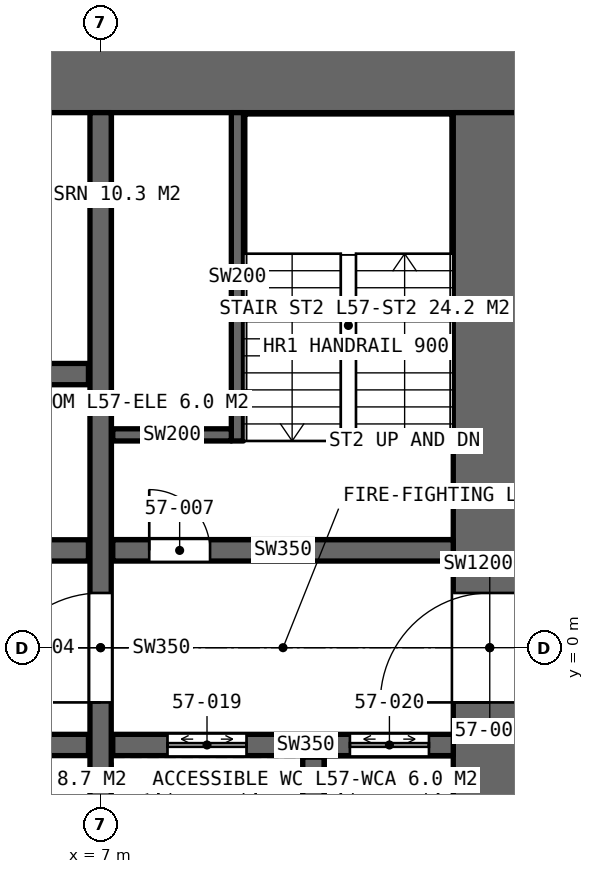
"""IFC4 building model, lengths in metres.
Left out: names, types, materials, properties, quantities, classifications, styles, units other than length and angle.
Written with IfcOpenShell. Run it as: python <this file> out.ifc"""

import sys

from ifc_helpers import new_model, si_unit, direction, frame, frame_2d, origin, place, context, subcontext, project, spatial, rectangle, extrude, element, fill, save


model = new_model("IFC4")
c1 = context("Model", 3, precision=1e-05, world=origin(), true_north=direction((0.0, 1.0)))
c2 = subcontext(c1, "Body", "Model", "MODEL_VIEW")
j1 = project(units=[si_unit("LENGTHUNIT", "METRE"), si_unit("PLANEANGLEUNIT", "RADIAN")], contexts=[c1])
p1 = place(None, origin())
s1 = spatial("IfcSite", under=j1, at=p1, CompositionType="ELEMENT")
p2 = place(p1, origin())
s2 = spatial("IfcBuilding", under=s1, at=p2, CompositionType="ELEMENT")
p3 = place(p2, frame((0.0, 0.0, 257.8)))
s3 = spatial("IfcBuildingStorey", under=s2, at=p3, CompositionType="ELEMENT", Elevation=257.8)
p4 = place(p3, frame((14.0, 9.4, 0.0), z_axis=(0.0, 0.0, 1.0), x_axis=(-1.0, 0.0, 0.0)))
e1 = element("IfcWall", 1, at=p4, inside=s3, PredefinedType="SHEAR", context=c2, shape_type="SweptSolid", body=[
    extrude(rectangle(XDim=28.0, YDim=1.2, at=frame_2d((14.0, 0.0))), origin(), (0.0, 0.0, 1.0), 4.2),
])
p5 = place(p4, frame((24.0, 0.0, 0.0)))
e2 = element("IfcOpeningElement", 2, at=p5, cuts=e1, PredefinedType="OPENING", context=c2, shape_type="SweptSolid", body=[
    extrude(rectangle(XDim=1.0, YDim=2.4, at=frame_2d((0.5, 1.2))), frame((0.0, 0.61, 0.0), z_axis=(0.0, -1.0, 0.0), x_axis=(1.0, 0.0, 0.0)), (0.0, 0.0, 1.0), 1.22),
])
p6 = place(p3, frame((13.4, -8.8, 0.0), z_axis=(0.0, 0.0, 1.0), x_axis=(0.0, 1.0, 0.0)))
e3 = element("IfcWall", 3, at=p6, inside=s3, PredefinedType="SHEAR", context=c2, shape_type="SweptSolid", body=[
    extrude(rectangle(XDim=17.6, YDim=1.2, at=frame_2d((8.8, 0.0))), origin(), (0.0, 0.0, 1.0), 4.2),
])
p7 = place(p6, frame((7.9, 0.0, 0.0)))
e4 = element("IfcOpeningElement", 4, at=p7, cuts=e3, PredefinedType="OPENING", context=c2, shape_type="SweptSolid", body=[
    extrude(rectangle(XDim=1.8, YDim=2.4, at=frame_2d((0.9, 1.2))), frame((0.0, 0.61, 0.0), z_axis=(0.0, -1.0, 0.0), x_axis=(1.0, 0.0, 0.0)), (0.0, 0.0, 1.0), 1.22),
])
p8 = place(p3, frame((7.0, -8.8, 0.0), z_axis=(0.0, 0.0, 1.0), x_axis=(0.0, 1.0, 0.0)))
e5 = element("IfcWall", 5, at=p8, inside=s3, PredefinedType="SHEAR", context=c2, shape_type="SweptSolid", body=[
    extrude(rectangle(XDim=17.6, YDim=0.35, at=frame_2d((8.8, 0.0))), origin(), (0.0, 0.0, 1.0), 4.2),
])
p9 = place(p8, frame((7.9, 0.0, 0.0)))
e6 = element("IfcOpeningElement", 6, at=p9, cuts=e5, PredefinedType="OPENING", context=c2, shape_type="SweptSolid", body=[
    extrude(rectangle(XDim=1.8, YDim=2.4, at=frame_2d((0.9, 1.2))), frame((0.0, 0.185, 0.0), z_axis=(0.0, -1.0, 0.0), x_axis=(1.0, 0.0, 0.0)), (0.0, 0.0, 1.0), 0.37),
])
p10 = place(p3, frame((-6.8, 1.6, 0.0), z_axis=(0.0, 0.0, 1.0), x_axis=(1.0, 0.0, 0.0)))
e7 = element("IfcWall", 7, at=p10, inside=s3, PredefinedType="SHEAR", context=c2, shape_type="SweptSolid", body=[
    extrude(rectangle(XDim=13.6, YDim=0.35, at=frame_2d((6.8, 0.0))), origin(), (0.0, 0.0, 1.0), 4.2),
])
p11 = place(p10, frame((11.9, 0.0, 0.0)))
e8 = element("IfcOpeningElement", 8, at=p11, cuts=e7, PredefinedType="OPENING", context=c2, shape_type="SweptSolid", body=[
    extrude(rectangle(XDim=1.0, YDim=2.4, at=frame_2d((0.5, 1.2))), frame((0.0, 0.185, 0.0), z_axis=(0.0, -1.0, 0.0), x_axis=(1.0, 0.0, 0.0)), (0.0, 0.0, 1.0), 0.37),
])
p12 = place(p10, frame((4.5, 0.0, 0.0)))
e9 = element("IfcOpeningElement", 9, at=p12, cuts=e7, PredefinedType="OPENING", context=c2, shape_type="SweptSolid", body=[
    extrude(rectangle(XDim=1.8, YDim=2.4, at=frame_2d((0.9, 1.2))), frame((0.0, 0.185, 0.0), z_axis=(0.0, -1.0, 0.0), x_axis=(1.0, 0.0, 0.0)), (0.0, 0.0, 1.0), 0.37),
])
p13 = place(p3, frame((-6.8, -1.6, 0.0), z_axis=(0.0, 0.0, 1.0), x_axis=(1.0, 0.0, 0.0)))
e10 = element("IfcWall", 10, at=p13, inside=s3, PredefinedType="SHEAR", context=c2, shape_type="SweptSolid", body=[
    extrude(rectangle(XDim=13.6, YDim=0.35, at=frame_2d((6.8, 0.0))), origin(), (0.0, 0.0, 1.0), 4.2),
])
p14 = place(p13, frame((0.365, 0.0, 0.0)))
e11 = element("IfcOpeningElement", 11, at=p14, cuts=e10, PredefinedType="OPENING", context=c2, shape_type="SweptSolid", body=[
    extrude(rectangle(XDim=1.0, YDim=2.4, at=frame_2d((0.5, 1.2))), frame((0.0, 0.185, 0.0), z_axis=(0.0, -1.0, 0.0), x_axis=(1.0, 0.0, 0.0)), (0.0, 0.0, 1.0), 0.37),
])
p15 = place(p13, frame((3.1, 0.0, 0.0)))
e12 = element("IfcOpeningElement", 12, at=p15, cuts=e10, PredefinedType="OPENING", context=c2, shape_type="SweptSolid", body=[
    extrude(rectangle(XDim=1.0, YDim=2.4, at=frame_2d((0.5, 1.2))), frame((0.0, 0.185, 0.0), z_axis=(0.0, -1.0, 0.0), x_axis=(1.0, 0.0, 0.0)), (0.0, 0.0, 1.0), 0.37),
])
p16 = place(p13, frame((6.7, 0.0, 0.0)))
e13 = element("IfcOpeningElement", 13, at=p16, cuts=e10, PredefinedType="OPENING", context=c2, shape_type="SweptSolid", body=[
    extrude(rectangle(XDim=1.0, YDim=2.4, at=frame_2d((0.5, 1.2))), frame((0.0, 0.185, 0.0), z_axis=(0.0, -1.0, 0.0), x_axis=(1.0, 0.0, 0.0)), (0.0, 0.0, 1.0), 0.37),
])
p17 = place(p13, frame((9.485, 0.0, 0.0)))
e14 = element("IfcOpeningElement", 14, at=p17, cuts=e10, PredefinedType="OPENING", context=c2, shape_type="SweptSolid", body=[
    extrude(rectangle(XDim=0.9, YDim=2.4, at=frame_2d((0.45, 1.2))), frame((0.0, 0.185, 0.0), z_axis=(0.0, -1.0, 0.0), x_axis=(1.0, 0.0, 0.0)), (0.0, 0.0, 1.0), 0.37),
])
p18 = place(p13, frame((11.85, 0.0, 0.0)))
e15 = element("IfcOpeningElement", 15, at=p18, cuts=e10, PredefinedType="OPENING", context=c2, shape_type="SweptSolid", body=[
    extrude(rectangle(XDim=1.1, YDim=2.4, at=frame_2d((0.55, 1.2))), frame((0.0, 0.185, 0.0), z_axis=(0.0, -1.0, 0.0), x_axis=(1.0, 0.0, 0.0)), (0.0, 0.0, 1.0), 0.37),
])
p19 = place(p3, frame((-6.8, 4.5, 0.0), z_axis=(0.0, 0.0, 1.0), x_axis=(1.0, 0.0, 0.0)))
e16 = element("IfcWall", 16, at=p19, inside=s3, PredefinedType="SHEAR", context=c2, shape_type="SweptSolid", body=[
    extrude(rectangle(XDim=13.6, YDim=0.35, at=frame_2d((6.8, 0.0))), origin(), (0.0, 0.0, 1.0), 4.2),
])
p20 = place(p19, frame((0.7, 0.0, 0.0)))
e17 = element("IfcOpeningElement", 17, at=p20, cuts=e16, PredefinedType="OPENING", context=c2, shape_type="SweptSolid", body=[
    extrude(rectangle(XDim=1.1, YDim=2.4, at=frame_2d((0.55, 1.2))), frame((0.0, 0.185, 0.0), z_axis=(0.0, -1.0, 0.0), x_axis=(1.0, 0.0, 0.0)), (0.0, 0.0, 1.0), 0.37),
])
p21 = place(p19, frame((3.5, 0.0, 0.0)))
e18 = element("IfcOpeningElement", 18, at=p21, cuts=e16, PredefinedType="OPENING", context=c2, shape_type="SweptSolid", body=[
    extrude(rectangle(XDim=1.1, YDim=2.4, at=frame_2d((0.55, 1.2))), frame((0.0, 0.185, 0.0), z_axis=(0.0, -1.0, 0.0), x_axis=(1.0, 0.0, 0.0)), (0.0, 0.0, 1.0), 0.37),
])
p22 = place(p19, frame((6.3, 0.0, 0.0)))
e19 = element("IfcOpeningElement", 19, at=p22, cuts=e16, PredefinedType="OPENING", context=c2, shape_type="SweptSolid", body=[
    extrude(rectangle(XDim=1.1, YDim=2.4, at=frame_2d((0.55, 1.2))), frame((0.0, 0.185, 0.0), z_axis=(0.0, -1.0, 0.0), x_axis=(1.0, 0.0, 0.0)), (0.0, 0.0, 1.0), 0.37),
])
p23 = place(p19, frame((9.1, 0.0, 0.0)))
e20 = element("IfcOpeningElement", 20, at=p23, cuts=e16, PredefinedType="OPENING", context=c2, shape_type="SweptSolid", body=[
    extrude(rectangle(XDim=1.1, YDim=2.4, at=frame_2d((0.55, 1.2))), frame((0.0, 0.185, 0.0), z_axis=(0.0, -1.0, 0.0), x_axis=(1.0, 0.0, 0.0)), (0.0, 0.0, 1.0), 0.37),
])
p24 = place(p3, frame((7.2, 1.6, 0.0), z_axis=(0.0, 0.0, 1.0), x_axis=(1.0, 0.0, 0.0)))
e21 = element("IfcWall", 21, at=p24, inside=s3, PredefinedType="SHEAR", context=c2, shape_type="SweptSolid", body=[
    extrude(rectangle(XDim=5.6, YDim=0.35, at=frame_2d((2.8, 0.0))), origin(), (0.0, 0.0, 1.0), 4.2),
])
p25 = place(p24, frame((0.6, 0.0, 0.0)))
e22 = element("IfcOpeningElement", 22, at=p25, cuts=e21, PredefinedType="OPENING", context=c2, shape_type="SweptSolid", body=[
    extrude(rectangle(XDim=1.0, YDim=2.4, at=frame_2d((0.5, 1.2))), frame((0.0, 0.185, 0.0), z_axis=(0.0, -1.0, 0.0), x_axis=(1.0, 0.0, 0.0)), (0.0, 0.0, 1.0), 0.37),
])
p26 = place(p3, frame((7.2, -1.6, 0.0), z_axis=(0.0, 0.0, 1.0), x_axis=(1.0, 0.0, 0.0)))
e23 = element("IfcWall", 23, at=p26, inside=s3, PredefinedType="SHEAR", context=c2, shape_type="SweptSolid", body=[
    extrude(rectangle(XDim=5.6, YDim=0.35, at=frame_2d((2.8, 0.0))), origin(), (0.0, 0.0, 1.0), 4.2),
])
p27 = place(p26, frame((0.9, 0.0, 0.0)))
e24 = element("IfcOpeningElement", 24, at=p27, cuts=e23, PredefinedType="OPENING", context=c2, shape_type="SweptSolid", body=[
    extrude(rectangle(XDim=1.3, YDim=2.4, at=frame_2d((0.65, 1.2))), frame((0.0, 0.185, 0.0), z_axis=(0.0, -1.0, 0.0), x_axis=(1.0, 0.0, 0.0)), (0.0, 0.0, 1.0), 0.37),
])
p28 = place(p26, frame((3.9, 0.0, 0.0)))
e25 = element("IfcOpeningElement", 25, at=p28, cuts=e23, PredefinedType="OPENING", context=c2, shape_type="SweptSolid", body=[
    extrude(rectangle(XDim=1.3, YDim=2.4, at=frame_2d((0.65, 1.2))), frame((0.0, 0.185, 0.0), z_axis=(0.0, -1.0, 0.0), x_axis=(1.0, 0.0, 0.0)), (0.0, 0.0, 1.0), 0.37),
])
p29 = place(p3, frame((10.5, -4.8, 0.0), z_axis=(0.0, 0.0, 1.0), x_axis=(0.0, 1.0, 0.0)))
e26 = element("IfcWall", 26, at=p29, inside=s3, PredefinedType="SHEAR", context=c2, shape_type="SweptSolid", body=[
    extrude(rectangle(XDim=3.0, YDim=0.35, at=frame_2d((1.5, 0.0))), origin(), (0.0, 0.0, 1.0), 4.2),
])
p30 = place(p3, frame((9.25, 3.4, 0.0), z_axis=(0.0, 0.0, 1.0), x_axis=(0.0, 1.0, 0.0)))
e27 = element("IfcWall", 27, at=p30, inside=s3, PredefinedType="SOLIDWALL", context=c2, shape_type="SweptSolid", body=[
    extrude(rectangle(XDim=5.4, YDim=0.2, at=frame_2d((2.7, 0.0))), origin(), (0.0, 0.0, 1.0), 4.2),
])
p31 = place(p3, frame((9.15, 3.5, 0.0), z_axis=(0.0, 0.0, 1.0), x_axis=(-1.0, 0.0, 0.0)))
e28 = element("IfcWall", 28, at=p31, inside=s3, PredefinedType="SOLIDWALL", context=c2, shape_type="SweptSolid", body=[
    extrude(rectangle(XDim=1.95, YDim=0.2, at=frame_2d((0.975, 0.0))), origin(), (0.0, 0.0, 1.0), 4.2),
])
p32 = place(p7, origin())
e29 = element("IfcDoor", 29, at=p32, inside=s3, OperationType="DOUBLE_DOOR_SINGLE_SWING", PredefinedType="DOOR", context=c2, shape_type="SweptSolid", body=[
    extrude(rectangle(XDim=1.8, YDim=2.4, at=frame_2d((0.9, 1.2))), frame((0.0, 0.025, 0.0), z_axis=(0.0, -1.0, 0.0), x_axis=(1.0, 0.0, 0.0)), (0.0, 0.0, 1.0), 0.05),
])
fill(e4, e29)
p33 = place(p9, origin())
e30 = element("IfcDoor", 30, at=p33, inside=s3, OperationType="DOUBLE_DOOR_SINGLE_SWING", PredefinedType="DOOR", context=c2, shape_type="SweptSolid", body=[
    extrude(rectangle(XDim=1.8, YDim=2.4, at=frame_2d((0.9, 1.2))), frame((0.0, 0.025, 0.0), z_axis=(0.0, -1.0, 0.0), x_axis=(1.0, 0.0, 0.0)), (0.0, 0.0, 1.0), 0.05),
])
fill(e6, e30)
p34 = place(p25, origin())
e31 = element("IfcDoor", 31, at=p34, inside=s3, OperationType="SINGLE_SWING_LEFT", PredefinedType="DOOR", context=c2, shape_type="SweptSolid", body=[
    extrude(rectangle(XDim=1.0, YDim=2.4, at=frame_2d((0.5, 1.2))), frame((0.0, 0.025, 0.0), z_axis=(0.0, -1.0, 0.0), x_axis=(1.0, 0.0, 0.0)), (0.0, 0.0, 1.0), 0.05),
])
fill(e22, e31)
p35 = place(p27, origin())
e32 = element("IfcDoor", 32, at=p35, inside=s3, OperationType="DOUBLE_DOOR_SLIDING", PredefinedType="DOOR", context=c2, shape_type="SweptSolid", body=[
    extrude(rectangle(XDim=1.3, YDim=2.4, at=frame_2d((0.65, 1.2))), frame((0.0, 0.025, 0.0), z_axis=(0.0, -1.0, 0.0), x_axis=(1.0, 0.0, 0.0)), (0.0, 0.0, 1.0), 0.05),
])
fill(e24, e32)
p36 = place(p28, origin())
e33 = element("IfcDoor", 33, at=p36, inside=s3, OperationType="DOUBLE_DOOR_SLIDING", PredefinedType="DOOR", context=c2, shape_type="SweptSolid", body=[
    extrude(rectangle(XDim=1.3, YDim=2.4, at=frame_2d((0.65, 1.2))), frame((0.0, 0.025, 0.0), z_axis=(0.0, -1.0, 0.0), x_axis=(1.0, 0.0, 0.0)), (0.0, 0.0, 1.0), 0.05),
])
fill(e25, e33)
save(model, sys.argv[1])
